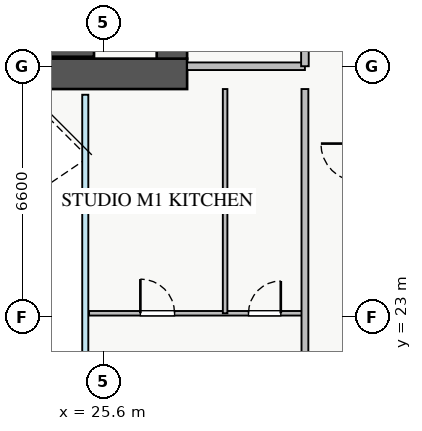
"""IFC4 building model, lengths in metres.
Left out: names, types, materials, properties, quantities, classifications, styles, units other than length and angle.
Written with IfcOpenShell. Run it as: python <this file> out.ifc"""

import sys

from ifc_helpers import new_model, si_unit, direction, frame, frame_2d, origin, place, context, subcontext, project, spatial, rectangle, extrude, source, transform, mapped, element, fill, save


model = new_model("IFC4")
c1 = context("Model", 3, precision=1e-05, world=origin(), true_north=direction((0.0, 1.0)))
c2 = subcontext(c1, "Body", "Model", "MODEL_VIEW")
j1 = project(units=[si_unit("LENGTHUNIT", "METRE"), si_unit("PLANEANGLEUNIT", "RADIAN")], contexts=[c1])
p1 = place(None, origin())
s1 = spatial("IfcSite", under=j1, at=p1, CompositionType="ELEMENT")
p2 = place(p1, origin())
s2 = spatial("IfcBuilding", under=s1, at=p2, CompositionType="ELEMENT")
p3 = place(p2, frame((0.0, 0.0, 76.25)))
s3 = spatial("IfcBuildingStorey", under=s2, at=p3, CompositionType="ELEMENT", Elevation=76.25)
p4 = place(p3, frame((18.2, 29.95, 0.0), z_axis=(0.0, 0.0, 1.0), x_axis=(1.0, 0.0, 0.0)))
e1 = element("IfcWall", 1, at=p4, inside=s3, PredefinedType="SHEAR", context=c2, shape_type="SweptSolid", body=[
    extrude(rectangle(XDim=7.15, YDim=0.2, at=frame_2d((3.575, 0.0))), origin(), (0.0, 0.0, 1.0), 3.25),
])
p5 = place(p3, frame((10.2, 29.4, 0.0), z_axis=(0.0, 0.0, 1.0), x_axis=(1.0, 0.0, 0.0)))
e2 = element("IfcWall", 2, at=p5, inside=s3, PredefinedType="SHEAR", context=c2, shape_type="SweptSolid", body=[
    extrude(rectangle(XDim=17.6, YDim=0.8, at=frame_2d((8.8, 0.0))), origin(), (0.0, 0.0, 1.0), 3.25),
])
p6 = place(p3, frame((27.4, 29.8, 0.0), z_axis=(0.0, 0.0, 1.0), x_axis=(0.0, 1.0, 0.0)))
e3 = element("IfcWall", 3, at=p6, inside=s3, PredefinedType="SHEAR", context=c2, shape_type="SweptSolid", body=[
    extrude(rectangle(XDim=5.6, YDim=0.8, at=frame_2d((2.8, 0.0))), origin(), (0.0, 0.0, 1.0), 3.25),
])
p7 = place(p6, frame((1.1, 0.0, 0.0)))
e4 = element("IfcOpeningElement", 4, at=p7, cuts=e3, PredefinedType="OPENING", context=c2, shape_type="SweptSolid", body=[
    extrude(rectangle(XDim=1.3, YDim=2.05, at=frame_2d((0.65, 1.025))), frame((0.0, 0.41, 0.0), z_axis=(0.0, -1.0, 0.0), x_axis=(1.0, 0.0, 0.0)), (0.0, 0.0, 1.0), 0.82),
])
p8 = place(p3, frame((27.8, 29.6, 0.0), z_axis=(0.0, 0.0, 1.0), x_axis=(1.0, 0.0, 0.0)))
e5 = element("IfcWall", 5, at=p8, inside=s3, PredefinedType="PARTITIONING", context=c2, shape_type="SweptSolid", body=[
    extrude(rectangle(XDim=3.1, YDim=0.2, at=frame_2d((1.55, 0.0))), origin(), (0.0, 0.0, 1.0), 3.07),
])
p9 = place(p3, frame((30.9, 29.6, 0.0), z_axis=(0.0, 0.0, 1.0), x_axis=(0.0, 1.0, 0.0)))
e6 = element("IfcWall", 6, at=p9, inside=s3, PredefinedType="PARTITIONING", context=c2, shape_type="SweptSolid", body=[
    extrude(rectangle(XDim=3.9, YDim=0.2, at=frame_2d((1.95, 0.0))), origin(), (0.0, 0.0, 1.0), 3.07),
])
p10 = place(p9, frame((1.4, 0.0, 0.0)))
e7 = element("IfcOpeningElement", 7, at=p10, cuts=e6, PredefinedType="OPENING", context=c2, shape_type="SweptSolid", body=[
    extrude(rectangle(XDim=1.1, YDim=2.05, at=frame_2d((0.55, 1.025))), frame((0.0, 0.11, 0.0), z_axis=(0.0, -1.0, 0.0), x_axis=(1.0, 0.0, 0.0)), (0.0, 0.0, 1.0), 0.22),
])
p11 = place(p3, frame((25.22, 23.1, 0.0), z_axis=(0.0, 0.0, 1.0), x_axis=(1.0, 0.0, 0.0)))
e8 = element("IfcWall", 8, at=p11, inside=s3, PredefinedType="PLUMBINGWALL", context=c2, shape_type="SweptSolid", body=[
    extrude(rectangle(XDim=5.68, YDim=0.12, at=frame_2d((2.84, 0.0))), origin(), (0.0, 0.0, 1.0), 3.07),
])
p12 = place(p11, frame((1.35, 0.0, 0.0)))
e9 = element("IfcOpeningElement", 9, at=p12, cuts=e8, PredefinedType="OPENING", context=c2, shape_type="SweptSolid", body=[
    extrude(rectangle(XDim=0.9, YDim=2.05, at=frame_2d((0.45, 1.025))), frame((0.0, 0.07, 0.0), z_axis=(0.0, -1.0, 0.0), x_axis=(1.0, 0.0, 0.0)), (0.0, 0.0, 1.0), 0.14),
])
p13 = place(p11, frame((4.195, 0.0, 0.0)))
e10 = element("IfcOpeningElement", 10, at=p13, cuts=e8, PredefinedType="OPENING", context=c2, shape_type="SweptSolid", body=[
    extrude(rectangle(XDim=0.85, YDim=2.05, at=frame_2d((0.425, 1.025))), frame((0.0, 0.07, 0.0), z_axis=(0.0, -1.0, 0.0), x_axis=(1.0, 0.0, 0.0)), (0.0, 0.0, 1.0), 0.14),
])
p14 = place(p3, frame((28.8, 23.1, 0.0), z_axis=(0.0, 0.0, 1.0), x_axis=(0.0, 1.0, 0.0)))
e11 = element("IfcWall", 11, at=p14, inside=s3, PredefinedType="PLUMBINGWALL", context=c2, shape_type="SweptSolid", body=[
    extrude(rectangle(XDim=5.9, YDim=0.12, at=frame_2d((2.95, 0.0))), origin(), (0.0, 0.0, 1.0), 3.07),
])
p15 = place(p3, frame((30.9, 17.0, 0.0), z_axis=(0.0, 0.0, 1.0), x_axis=(0.0, 1.0, 0.0)))
e12 = element("IfcWall", 12, at=p15, inside=s3, PredefinedType="PARTITIONING", context=c2, shape_type="SweptSolid", body=[
    extrude(rectangle(XDim=12.0, YDim=0.18, at=frame_2d((6.0, 0.0))), origin(), (0.0, 0.0, 1.0), 3.07),
])
p16 = place(p15, frame((2.36, 0.0, 0.0)))
e13 = element("IfcOpeningElement", 13, at=p16, cuts=e12, PredefinedType="OPENING", context=c2, shape_type="SweptSolid", body=[
    extrude(rectangle(XDim=1.0, YDim=2.05, at=frame_2d((0.5, 1.025))), frame((0.0, 0.1, 0.0), z_axis=(0.0, -1.0, 0.0), x_axis=(1.0, 0.0, 0.0)), (0.0, 0.0, 1.0), 0.2),
])
m1 = source(origin(), c2, "Body", "SweptSolid", [
    extrude(rectangle(XDim=0.9, YDim=2.05, at=frame_2d((0.45, 1.025))), frame((0.0, 0.025, 0.0), z_axis=(0.0, -1.0, 0.0), x_axis=(1.0, 0.0, 0.0)), (0.0, 0.0, 1.0), 0.05),
])
p17 = place(p12, origin())
e14 = element("IfcDoor", 14, at=p17, inside=s3, OperationType="SINGLE_SWING_LEFT", PredefinedType="DOOR", context=c2, shape_type="MappedRepresentation", body=[
    mapped(m1, transform((0.0, 0.0, 0.0), x_axis=(1.0, 0.0, 0.0), y_axis=(0.0, 1.0, 0.0), z_axis=(0.0, 0.0, 1.0), scale=1.0)),
])
fill(e9, e14)
m2 = source(origin(), c2, "Body", "SweptSolid", [
    extrude(rectangle(XDim=0.85, YDim=2.05, at=frame_2d((0.425, 1.025))), frame((0.0, 0.025, 0.0), z_axis=(0.0, -1.0, 0.0), x_axis=(1.0, 0.0, 0.0)), (0.0, 0.0, 1.0), 0.05),
])
p18 = place(p13, origin())
e15 = element("IfcDoor", 15, at=p18, inside=s3, OperationType="SINGLE_SWING_RIGHT", PredefinedType="DOOR", context=c2, shape_type="MappedRepresentation", body=[
    mapped(m2, transform((0.0, 0.0, 0.0), x_axis=(1.0, 0.0, 0.0), y_axis=(0.0, 1.0, 0.0), z_axis=(0.0, 0.0, 1.0), scale=1.0)),
])
fill(e10, e15)
save(model, sys.argv[1])
